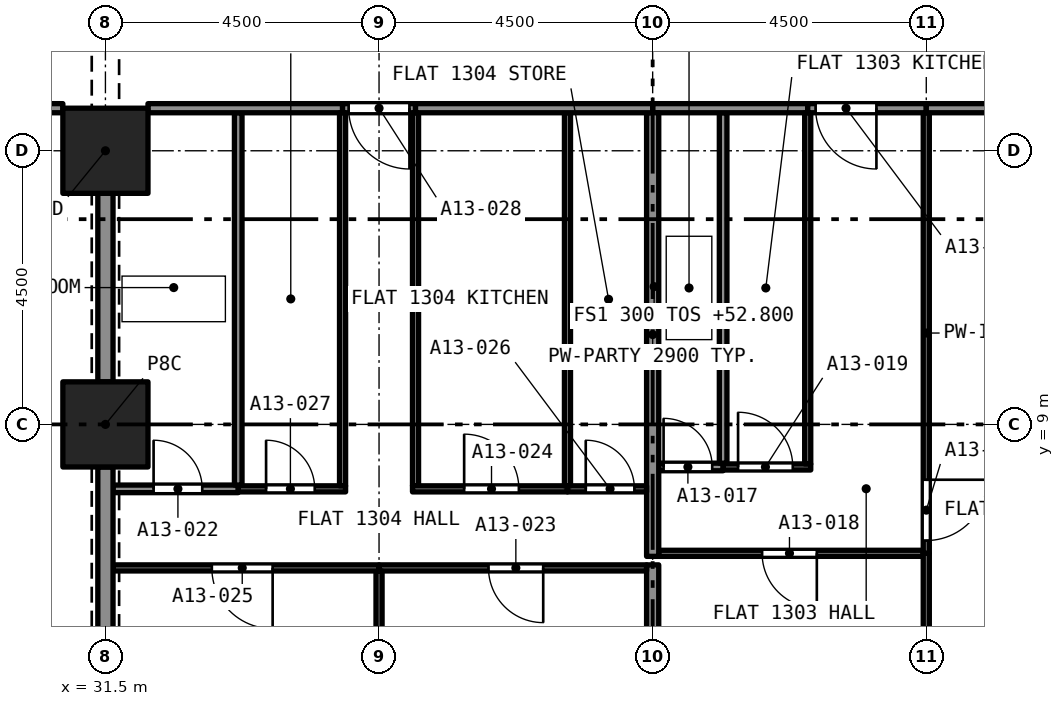
"""IFC4 building model, lengths in metres.
Left out: names, types, materials, properties, quantities, classifications, styles, units other than length and angle.
Written with IfcOpenShell. Run it as: python <this file> out.ifc"""

import sys

from ifc_helpers import new_model, si_unit, direction, frame, frame_2d, origin, origin_2d, place, context, subcontext, project, spatial, rectangle, extrude, element, fill, save


model = new_model("IFC4")
c1 = context("Model", 3, precision=1e-05, world=origin(), true_north=direction((0.0, 1.0)))
c2 = subcontext(c1, "Body", "Model", "MODEL_VIEW")
j1 = project(units=[si_unit("LENGTHUNIT", "METRE"), si_unit("PLANEANGLEUNIT", "RADIAN")], contexts=[c1])
p1 = place(None, origin())
s1 = spatial("IfcSite", under=j1, at=p1, CompositionType="ELEMENT")
p2 = place(p1, origin())
s2 = spatial("IfcBuilding", under=s1, at=p2, CompositionType="ELEMENT")
p3 = place(p2, frame((0.0, 0.0, 52.8)))
s3 = spatial("IfcBuildingStorey", under=s2, at=p3, CompositionType="ELEMENT", Elevation=52.8)
for number, where, z_axis, x_axis in (
    (1, (31.5, 9.0, 0.0), (0.0, 0.0, 1.0), (1.0, 0.0, 0.0)),
    (2, (31.5, 13.5, 0.0), (0.0, 0.0, 1.0), (1.0, 0.0, 0.0)),
):
    element("IfcColumn", number, at=place(p3, frame(where, z_axis=z_axis, x_axis=x_axis)), inside=s3, PredefinedType="COLUMN", context=c2, shape_type="SweptSolid", body=[
        extrude(rectangle(XDim=1.4, YDim=1.4, at=origin_2d()), origin(), (0.0, 0.0, 1.0), 3.2),
    ])
p4 = place(p3, frame((40.6, 8.3, 0.0), z_axis=(0.0, 0.0, 1.0), x_axis=(1.0, 0.0, 0.0)))
e3 = element("IfcWall", 3, at=p4, inside=s3, PredefinedType="PARTITIONING", context=c2, shape_type="SweptSolid", body=[
    extrude(rectangle(XDim=1.059, YDim=0.125, at=frame_2d((0.53, 0.0))), origin(), (0.0, 0.0, 1.0), 2.9),
])
p5 = place(p4, frame((0.08, 0.0, 0.0)))
e4 = element("IfcOpeningElement", 4, at=p5, cuts=e3, PredefinedType="OPENING", context=c2, shape_type="SweptSolid", body=[
    extrude(rectangle(XDim=0.8, YDim=2.1, at=frame_2d((0.4, 1.05))), frame((0.0, 0.073, 0.0), z_axis=(0.0, -1.0, 0.0), x_axis=(1.0, 0.0, 0.0)), (0.0, 0.0, 1.0), 0.145),
])
p6 = place(p3, frame((41.659, 8.363, 0.0), z_axis=(0.0, 0.0, 1.0), x_axis=(0.0, 1.0, 0.0)))
e5 = element("IfcWall", 5, at=p6, inside=s3, PredefinedType="PARTITIONING", context=c2, shape_type="SweptSolid", body=[
    extrude(rectangle(XDim=5.762, YDim=0.125, at=frame_2d((2.881, 0.0))), origin(), (0.0, 0.0, 1.0), 2.9),
])
p7 = place(p3, frame((40.5, 14.2, 0.0), z_axis=(0.0, 0.0, 1.0), x_axis=(1.0, 0.0, 0.0)))
e6 = element("IfcWall", 6, at=p7, inside=s3, PredefinedType="PARTITIONING", context=c2, shape_type="SweptSolid", body=[
    extrude(rectangle(XDim=2.55, YDim=0.15, at=frame_2d((1.275, 0.0))), origin(), (0.0, 0.0, 1.0), 2.9),
])
p8 = place(p3, frame((44.95, 6.88, 0.0), z_axis=(0.0, 0.0, 1.0), x_axis=(-1.0, 0.0, 0.0)))
e7 = element("IfcWall", 7, at=p8, inside=s3, PredefinedType="PARTITIONING", context=c2, shape_type="SweptSolid", body=[
    extrude(rectangle(XDim=4.35, YDim=0.1, at=frame_2d((2.175, 0.0))), origin(), (0.0, 0.0, 1.0), 2.9),
])
p9 = place(p8, frame((1.75, 0.0, 0.0)))
e8 = element("IfcOpeningElement", 8, at=p9, cuts=e7, PredefinedType="OPENING", context=c2, shape_type="SweptSolid", body=[
    extrude(rectangle(XDim=0.9, YDim=2.1, at=frame_2d((0.45, 1.05))), frame((0.0, 0.06, 0.0), z_axis=(0.0, -1.0, 0.0), x_axis=(1.0, 0.0, 0.0)), (0.0, 0.0, 1.0), 0.12),
])
p10 = place(p3, frame((45.0, 0.758, 0.0), z_axis=(0.0, 0.0, 1.0), x_axis=(0.0, 1.0, 0.0)))
e9 = element("IfcWall", 9, at=p10, inside=s3, PredefinedType="PARTITIONING", context=c2, shape_type="SweptSolid", body=[
    extrude(rectangle(XDim=6.122, YDim=0.1, at=frame_2d((3.061, 0.0))), origin(), (0.0, 0.0, 1.0), 2.9),
])
p11 = place(p3, frame((40.5, 0.7, 0.0), z_axis=(0.0, 0.0, 1.0), x_axis=(0.0, 1.0, 0.0)))
e10 = element("IfcWall", 10, at=p11, inside=s3, PredefinedType="PARTITIONING", context=c2, shape_type="SweptSolid", body=[
    extrude(rectangle(XDim=5.99, YDim=0.2, at=frame_2d((2.995, 0.0))), origin(), (0.0, 0.0, 1.0), 2.9),
])
p12 = place(p3, frame((41.659, 8.3, 0.0), z_axis=(0.0, 0.0, 1.0), x_axis=(1.0, 0.0, 0.0)))
e11 = element("IfcWall", 11, at=p12, inside=s3, PredefinedType="PARTITIONING", context=c2, shape_type="SweptSolid", body=[
    extrude(rectangle(XDim=1.441, YDim=0.1, at=frame_2d((0.72, 0.0))), origin(), (0.0, 0.0, 1.0), 2.9),
])
p13 = place(p12, frame((0.246, 0.0, 0.0)))
e12 = element("IfcOpeningElement", 12, at=p13, cuts=e11, PredefinedType="OPENING", context=c2, shape_type="SweptSolid", body=[
    extrude(rectangle(XDim=0.9, YDim=2.1, at=frame_2d((0.45, 1.05))), frame((0.0, 0.06, 0.0), z_axis=(0.0, -1.0, 0.0), x_axis=(1.0, 0.0, 0.0)), (0.0, 0.0, 1.0), 0.12),
])
p14 = place(p3, frame((43.05, 8.35, 0.0), z_axis=(0.0, 0.0, 1.0), x_axis=(0.0, 1.0, 0.0)))
e13 = element("IfcWall", 13, at=p14, inside=s3, PredefinedType="PARTITIONING", context=c2, shape_type="SweptSolid", body=[
    extrude(rectangle(XDim=5.775, YDim=0.1, at=frame_2d((2.887, 0.0))), origin(), (0.0, 0.0, 1.0), 2.9),
])
p15 = place(p3, frame((45.0, 14.125, 0.0), z_axis=(0.0, 0.0, 1.0), x_axis=(0.0, -1.0, 0.0)))
e14 = element("IfcWall", 14, at=p15, inside=s3, PredefinedType="PARTITIONING", context=c2, shape_type="SweptSolid", body=[
    extrude(rectangle(XDim=7.245, YDim=0.1, at=frame_2d((3.623, 0.0))), origin(), (0.0, 0.0, 1.0), 2.9),
])
p16 = place(p15, frame((6.035, 0.0, 0.0)))
e15 = element("IfcOpeningElement", 15, at=p16, cuts=e14, PredefinedType="OPENING", context=c2, shape_type="SweptSolid", body=[
    extrude(rectangle(XDim=1.0, YDim=2.1, at=frame_2d((0.5, 1.05))), frame((0.0, 0.06, 0.0), z_axis=(0.0, -1.0, 0.0), x_axis=(1.0, 0.0, 0.0)), (0.0, 0.0, 1.0), 0.12),
])
p17 = place(p3, frame((40.5, 6.83, 0.0), z_axis=(0.0, 0.0, 1.0), x_axis=(0.0, 1.0, 0.0)))
e16 = element("IfcWall", 16, at=p17, inside=s3, PredefinedType="PARTITIONING", context=c2, shape_type="SweptSolid", body=[
    extrude(rectangle(XDim=7.295, YDim=0.2, at=frame_2d((3.647, 0.0))), origin(), (0.0, 0.0, 1.0), 2.9),
])
p18 = place(p3, frame((45.0, 14.2, 0.0), z_axis=(0.0, 0.0, 1.0), x_axis=(-1.0, 0.0, 0.0)))
e17 = element("IfcWall", 17, at=p18, inside=s3, PredefinedType="PARTITIONING", context=c2, shape_type="SweptSolid", body=[
    extrude(rectangle(XDim=1.95, YDim=0.15, at=frame_2d((0.975, 0.0))), origin(), (0.0, 0.0, 1.0), 2.9),
])
p19 = place(p18, frame((0.82, 0.0, 0.0)))
e18 = element("IfcOpeningElement", 18, at=p19, cuts=e17, PredefinedType="OPENING", context=c2, shape_type="SweptSolid", body=[
    extrude(rectangle(XDim=1.0, YDim=2.1, at=frame_2d((0.5, 1.05))), frame((0.0, 0.085, 0.0), z_axis=(0.0, -1.0, 0.0), x_axis=(1.0, 0.0, 0.0)), (0.0, 0.0, 1.0), 0.17),
])
p20 = place(p3, frame((45.0, 14.2, 0.0), z_axis=(0.0, 0.0, 1.0), x_axis=(1.0, 0.0, 0.0)))
e19 = element("IfcWall", 19, at=p20, inside=s3, PredefinedType="PARTITIONING", context=c2, shape_type="SweptSolid", body=[
    extrude(rectangle(XDim=3.8, YDim=0.15, at=frame_2d((1.9, 0.0))), origin(), (0.0, 0.0, 1.0), 2.9),
])
p21 = place(p3, frame((31.625, 7.94, 0.0), z_axis=(0.0, 0.0, 1.0), x_axis=(1.0, 0.0, 0.0)))
e20 = element("IfcWall", 20, at=p21, inside=s3, PredefinedType="PARTITIONING", context=c2, shape_type="SweptSolid", body=[
    extrude(rectangle(XDim=2.059, YDim=0.125, at=frame_2d((1.03, 0.0))), origin(), (0.0, 0.0, 1.0), 2.9),
])
p22 = place(p21, frame((0.667, 0.0, 0.0)))
e21 = element("IfcOpeningElement", 21, at=p22, cuts=e20, PredefinedType="OPENING", context=c2, shape_type="SweptSolid", body=[
    extrude(rectangle(XDim=0.8, YDim=2.1, at=frame_2d((0.4, 1.05))), frame((0.0, 0.073, 0.0), z_axis=(0.0, -1.0, 0.0), x_axis=(1.0, 0.0, 0.0)), (0.0, 0.0, 1.0), 0.145),
])
p23 = place(p3, frame((33.684, 8.002, 0.0), z_axis=(0.0, 0.0, 1.0), x_axis=(0.0, 1.0, 0.0)))
e22 = element("IfcWall", 22, at=p23, inside=s3, PredefinedType="PARTITIONING", context=c2, shape_type="SweptSolid", body=[
    extrude(rectangle(XDim=6.123, YDim=0.125, at=frame_2d((3.061, 0.0))), origin(), (0.0, 0.0, 1.0), 2.9),
])
p24 = place(p3, frame((31.5, 9.7, 0.0), z_axis=(0.0, 0.0, 1.0), x_axis=(0.0, 1.0, 0.0)))
e23 = element("IfcWall", 23, at=p24, inside=s3, PredefinedType="PARTITIONING", context=c2, shape_type="SweptSolid", body=[
    extrude(rectangle(XDim=3.1, YDim=0.25, at=frame_2d((1.55, 0.0))), origin(), (0.0, 0.0, 1.0), 2.38),
])
p25 = place(p3, frame((32.2, 14.2, 0.0), z_axis=(0.0, 0.0, 1.0), x_axis=(1.0, 0.0, 0.0)))
e24 = element("IfcWall", 24, at=p25, inside=s3, PredefinedType="PARTITIONING", context=c2, shape_type="SweptSolid", body=[
    extrude(rectangle(XDim=3.2, YDim=0.15, at=frame_2d((1.6, 0.0))), origin(), (0.0, 0.0, 1.0), 2.9),
])
p26 = place(p3, frame((40.4, 6.64, 0.0), z_axis=(0.0, 0.0, 1.0), x_axis=(-1.0, 0.0, 0.0)))
e25 = element("IfcWall", 25, at=p26, inside=s3, PredefinedType="PARTITIONING", context=c2, shape_type="SweptSolid", body=[
    extrude(rectangle(XDim=4.4, YDim=0.1, at=frame_2d((2.2, 0.0))), origin(), (0.0, 0.0, 1.0), 2.9),
])
p27 = place(p26, frame((1.7, 0.0, 0.0)))
e26 = element("IfcOpeningElement", 26, at=p27, cuts=e25, PredefinedType="OPENING", context=c2, shape_type="SweptSolid", body=[
    extrude(rectangle(XDim=0.9, YDim=2.1, at=frame_2d((0.45, 1.05))), frame((0.0, 0.06, 0.0), z_axis=(0.0, -1.0, 0.0), x_axis=(1.0, 0.0, 0.0)), (0.0, 0.0, 1.0), 0.12),
])
p28 = place(p3, frame((36.0, 0.7, 0.0), z_axis=(0.0, 0.0, 1.0), x_axis=(0.0, 1.0, 0.0)))
e27 = element("IfcWall", 27, at=p28, inside=s3, PredefinedType="PARTITIONING", context=c2, shape_type="SweptSolid", body=[
    extrude(rectangle(XDim=5.89, YDim=0.1, at=frame_2d((2.945, 0.0))), origin(), (0.0, 0.0, 1.0), 2.9),
])
p29 = place(p3, frame((36.6, 7.99, 0.0), z_axis=(0.0, 0.0, 1.0), x_axis=(0.0, 1.0, 0.0)))
e28 = element("IfcWall", 28, at=p29, inside=s3, PredefinedType="PARTITIONING", context=c2, shape_type="SweptSolid", body=[
    extrude(rectangle(XDim=6.135, YDim=0.1, at=frame_2d((3.067, 0.0))), origin(), (0.0, 0.0, 1.0), 2.9),
])
p30 = place(p3, frame((36.55, 7.94, 0.0), z_axis=(0.0, 0.0, 1.0), x_axis=(1.0, 0.0, 0.0)))
e29 = element("IfcWall", 29, at=p30, inside=s3, PredefinedType="PARTITIONING", context=c2, shape_type="SweptSolid", body=[
    extrude(rectangle(XDim=2.549, YDim=0.1, at=frame_2d((1.275, 0.0))), origin(), (0.0, 0.0, 1.0), 2.9),
])
p31 = place(p30, frame((0.85, 0.0, 0.0)))
e30 = element("IfcOpeningElement", 30, at=p31, cuts=e29, PredefinedType="OPENING", context=c2, shape_type="SweptSolid", body=[
    extrude(rectangle(XDim=0.9, YDim=2.1, at=frame_2d((0.45, 1.05))), frame((0.0, 0.06, 0.0), z_axis=(0.0, -1.0, 0.0), x_axis=(1.0, 0.0, 0.0)), (0.0, 0.0, 1.0), 0.12),
])
p32 = place(p3, frame((36.0, 6.64, 0.0), z_axis=(0.0, 0.0, 1.0), x_axis=(-1.0, 0.0, 0.0)))
e31 = element("IfcWall", 31, at=p32, inside=s3, PredefinedType="PARTITIONING", context=c2, shape_type="SweptSolid", body=[
    extrude(rectangle(XDim=4.375, YDim=0.1, at=frame_2d((2.188, 0.0))), origin(), (0.0, 0.0, 1.0), 2.9),
])
p33 = place(p32, frame((1.75, 0.0, 0.0)))
e32 = element("IfcOpeningElement", 32, at=p33, cuts=e31, PredefinedType="OPENING", context=c2, shape_type="SweptSolid", body=[
    extrude(rectangle(XDim=1.0, YDim=2.1, at=frame_2d((0.5, 1.05))), frame((0.0, 0.06, 0.0), z_axis=(0.0, -1.0, 0.0), x_axis=(1.0, 0.0, 0.0)), (0.0, 0.0, 1.0), 0.12),
])
p34 = place(p3, frame((39.099, 7.94, 0.0), z_axis=(0.0, 0.0, 1.0), x_axis=(1.0, 0.0, 0.0)))
e33 = element("IfcWall", 33, at=p34, inside=s3, PredefinedType="PARTITIONING", context=c2, shape_type="SweptSolid", body=[
    extrude(rectangle(XDim=1.301, YDim=0.1, at=frame_2d((0.65, 0.0))), origin(), (0.0, 0.0, 1.0), 2.9),
])
p35 = place(p34, frame((0.3, 0.0, 0.0)))
e34 = element("IfcOpeningElement", 34, at=p35, cuts=e33, PredefinedType="OPENING", context=c2, shape_type="SweptSolid", body=[
    extrude(rectangle(XDim=0.8, YDim=2.1, at=frame_2d((0.4, 1.05))), frame((0.0, 0.06, 0.0), z_axis=(0.0, -1.0, 0.0), x_axis=(1.0, 0.0, 0.0)), (0.0, 0.0, 1.0), 0.12),
])
p36 = place(p3, frame((33.684, 7.94, 0.0), z_axis=(0.0, 0.0, 1.0), x_axis=(1.0, 0.0, 0.0)))
e35 = element("IfcWall", 35, at=p36, inside=s3, PredefinedType="PARTITIONING", context=c2, shape_type="SweptSolid", body=[
    extrude(rectangle(XDim=1.766, YDim=0.1, at=frame_2d((0.883, 0.0))), origin(), (0.0, 0.0, 1.0), 2.9),
])
p37 = place(p36, frame((0.458, 0.0, 0.0)))
e36 = element("IfcOpeningElement", 36, at=p37, cuts=e35, PredefinedType="OPENING", context=c2, shape_type="SweptSolid", body=[
    extrude(rectangle(XDim=0.8, YDim=2.1, at=frame_2d((0.4, 1.05))), frame((0.0, 0.06, 0.0), z_axis=(0.0, -1.0, 0.0), x_axis=(1.0, 0.0, 0.0)), (0.0, 0.0, 1.0), 0.12),
])
p38 = place(p3, frame((35.4, 7.99, 0.0), z_axis=(0.0, 0.0, 1.0), x_axis=(0.0, 1.0, 0.0)))
e37 = element("IfcWall", 37, at=p38, inside=s3, PredefinedType="PARTITIONING", context=c2, shape_type="SweptSolid", body=[
    extrude(rectangle(XDim=6.135, YDim=0.1, at=frame_2d((3.067, 0.0))), origin(), (0.0, 0.0, 1.0), 2.9),
])
p39 = place(p3, frame((36.6, 14.2, 0.0), z_axis=(0.0, 0.0, 1.0), x_axis=(-1.0, 0.0, 0.0)))
e38 = element("IfcWall", 38, at=p39, inside=s3, PredefinedType="PARTITIONING", context=c2, shape_type="SweptSolid", body=[
    extrude(rectangle(XDim=1.2, YDim=0.15, at=frame_2d((0.6, 0.0))), origin(), (0.0, 0.0, 1.0), 2.9),
])
p40 = place(p39, frame((0.1, 0.0, 0.0)))
e39 = element("IfcOpeningElement", 39, at=p40, cuts=e38, PredefinedType="OPENING", context=c2, shape_type="SweptSolid", body=[
    extrude(rectangle(XDim=1.0, YDim=2.1, at=frame_2d((0.5, 1.05))), frame((0.0, 0.085, 0.0), z_axis=(0.0, -1.0, 0.0), x_axis=(1.0, 0.0, 0.0)), (0.0, 0.0, 1.0), 0.17),
])
p41 = place(p3, frame((39.099, 7.99, 0.0), z_axis=(0.0, 0.0, 1.0), x_axis=(0.0, 1.0, 0.0)))
e40 = element("IfcWall", 40, at=p41, inside=s3, PredefinedType="PARTITIONING", context=c2, shape_type="SweptSolid", body=[
    extrude(rectangle(XDim=6.135, YDim=0.1, at=frame_2d((3.067, 0.0))), origin(), (0.0, 0.0, 1.0), 2.9),
])
p42 = place(p3, frame((36.6, 14.2, 0.0), z_axis=(0.0, 0.0, 1.0), x_axis=(1.0, 0.0, 0.0)))
e41 = element("IfcWall", 41, at=p42, inside=s3, PredefinedType="PARTITIONING", context=c2, shape_type="SweptSolid", body=[
    extrude(rectangle(XDim=3.9, YDim=0.15, at=frame_2d((1.95, 0.0))), origin(), (0.0, 0.0, 1.0), 2.9),
])
p43 = place(p3, frame((31.5, 5.2, 0.0), z_axis=(0.0, 0.0, 1.0), x_axis=(0.0, 1.0, 0.0)))
e42 = element("IfcWall", 42, at=p43, inside=s3, PredefinedType="PARTITIONING", context=c2, shape_type="SweptSolid", body=[
    extrude(rectangle(XDim=3.1, YDim=0.25, at=frame_2d((1.55, 0.0))), origin(), (0.0, 0.0, 1.0), 2.38),
])
p44 = place(p3, frame((30.8, 14.2, 0.0), z_axis=(0.0, 0.0, 1.0), x_axis=(-1.0, 0.0, 0.0)))
e43 = element("IfcWall", 43, at=p44, inside=s3, PredefinedType="PARTITIONING", context=c2, shape_type="SweptSolid", body=[
    extrude(rectangle(XDim=3.8, YDim=0.15, at=frame_2d((1.9, 0.0))), origin(), (0.0, 0.0, 1.0), 2.75),
])
p45 = place(p44, frame((1.05, 0.0, 0.0)))
e44 = element("IfcOpeningElement", 44, at=p45, cuts=e43, PredefinedType="OPENING", context=c2, shape_type="SweptSolid", body=[
    extrude(rectangle(XDim=1.0, YDim=2.1, at=frame_2d((0.5, 1.05))), frame((0.0, 0.085, 0.0), z_axis=(0.0, -1.0, 0.0), x_axis=(1.0, 0.0, 0.0)), (0.0, 0.0, 1.0), 0.17),
])
p46 = place(p5, origin())
e45 = element("IfcDoor", 45, at=p46, inside=s3, OperationType="SINGLE_SWING_LEFT", PredefinedType="DOOR", context=c2, shape_type="SweptSolid", body=[
    extrude(rectangle(XDim=0.8, YDim=2.1, at=frame_2d((0.4, 1.05))), frame((0.0, 0.025, 0.0), z_axis=(0.0, -1.0, 0.0), x_axis=(1.0, 0.0, 0.0)), (0.0, 0.0, 1.0), 0.05),
])
fill(e4, e45)
p47 = place(p9, origin())
e46 = element("IfcDoor", 46, at=p47, inside=s3, OperationType="SINGLE_SWING_RIGHT", PredefinedType="DOOR", context=c2, shape_type="SweptSolid", body=[
    extrude(rectangle(XDim=0.9, YDim=2.1, at=frame_2d((0.45, 1.05))), frame((0.0, 0.025, 0.0), z_axis=(0.0, -1.0, 0.0), x_axis=(1.0, 0.0, 0.0)), (0.0, 0.0, 1.0), 0.05),
])
fill(e8, e46)
p48 = place(p13, origin())
e47 = element("IfcDoor", 47, at=p48, inside=s3, OperationType="SINGLE_SWING_LEFT", PredefinedType="DOOR", context=c2, shape_type="SweptSolid", body=[
    extrude(rectangle(XDim=0.9, YDim=2.1, at=frame_2d((0.45, 1.05))), frame((0.0, 0.025, 0.0), z_axis=(0.0, -1.0, 0.0), x_axis=(1.0, 0.0, 0.0)), (0.0, 0.0, 1.0), 0.05),
])
fill(e12, e47)
p49 = place(p16, origin())
e48 = element("IfcDoor", 48, at=p49, inside=s3, OperationType="SINGLE_SWING_RIGHT", PredefinedType="DOOR", context=c2, shape_type="SweptSolid", body=[
    extrude(rectangle(XDim=1.0, YDim=2.1, at=frame_2d((0.5, 1.05))), frame((0.0, 0.025, 0.0), z_axis=(0.0, -1.0, 0.0), x_axis=(1.0, 0.0, 0.0)), (0.0, 0.0, 1.0), 0.05),
])
fill(e15, e48)
p50 = place(p19, origin())
e49 = element("IfcDoor", 49, at=p50, inside=s3, OperationType="SINGLE_SWING_RIGHT", PredefinedType="DOOR", context=c2, shape_type="SweptSolid", body=[
    extrude(rectangle(XDim=1.0, YDim=2.1, at=frame_2d((0.5, 1.05))), frame((0.0, 0.025, 0.0), z_axis=(0.0, -1.0, 0.0), x_axis=(1.0, 0.0, 0.0)), (0.0, 0.0, 1.0), 0.05),
])
fill(e18, e49)
p51 = place(p22, origin())
e50 = element("IfcDoor", 50, at=p51, inside=s3, OperationType="SINGLE_SWING_RIGHT", PredefinedType="DOOR", context=c2, shape_type="SweptSolid", body=[
    extrude(rectangle(XDim=0.8, YDim=2.1, at=frame_2d((0.4, 1.05))), frame((0.0, 0.025, 0.0), z_axis=(0.0, -1.0, 0.0), x_axis=(1.0, 0.0, 0.0)), (0.0, 0.0, 1.0), 0.05),
])
fill(e21, e50)
p52 = place(p27, origin())
e51 = element("IfcDoor", 51, at=p52, inside=s3, OperationType="SINGLE_SWING_LEFT", PredefinedType="DOOR", context=c2, shape_type="SweptSolid", body=[
    extrude(rectangle(XDim=0.9, YDim=2.1, at=frame_2d((0.45, 1.05))), frame((0.0, 0.025, 0.0), z_axis=(0.0, -1.0, 0.0), x_axis=(1.0, 0.0, 0.0)), (0.0, 0.0, 1.0), 0.05),
])
fill(e26, e51)
p53 = place(p31, origin())
e52 = element("IfcDoor", 52, at=p53, inside=s3, OperationType="SINGLE_SWING_RIGHT", PredefinedType="DOOR", context=c2, shape_type="SweptSolid", body=[
    extrude(rectangle(XDim=0.9, YDim=2.1, at=frame_2d((0.45, 1.05))), frame((0.0, 0.025, 0.0), z_axis=(0.0, -1.0, 0.0), x_axis=(1.0, 0.0, 0.0)), (0.0, 0.0, 1.0), 0.05),
])
fill(e30, e52)
p54 = place(p33, origin())
e53 = element("IfcDoor", 53, at=p54, inside=s3, OperationType="SINGLE_SWING_RIGHT", PredefinedType="DOOR", context=c2, shape_type="SweptSolid", body=[
    extrude(rectangle(XDim=1.0, YDim=2.1, at=frame_2d((0.5, 1.05))), frame((0.0, 0.025, 0.0), z_axis=(0.0, -1.0, 0.0), x_axis=(1.0, 0.0, 0.0)), (0.0, 0.0, 1.0), 0.05),
])
fill(e32, e53)
p55 = place(p35, origin())
e54 = element("IfcDoor", 54, at=p55, inside=s3, OperationType="SINGLE_SWING_RIGHT", PredefinedType="DOOR", context=c2, shape_type="SweptSolid", body=[
    extrude(rectangle(XDim=0.8, YDim=2.1, at=frame_2d((0.4, 1.05))), frame((0.0, 0.025, 0.0), z_axis=(0.0, -1.0, 0.0), x_axis=(1.0, 0.0, 0.0)), (0.0, 0.0, 1.0), 0.05),
])
fill(e34, e54)
p56 = place(p37, origin())
e55 = element("IfcDoor", 55, at=p56, inside=s3, OperationType="SINGLE_SWING_LEFT", PredefinedType="DOOR", context=c2, shape_type="SweptSolid", body=[
    extrude(rectangle(XDim=0.8, YDim=2.1, at=frame_2d((0.4, 1.05))), frame((0.0, 0.025, 0.0), z_axis=(0.0, -1.0, 0.0), x_axis=(1.0, 0.0, 0.0)), (0.0, 0.0, 1.0), 0.05),
])
fill(e36, e55)
p57 = place(p40, origin())
e56 = element("IfcDoor", 56, at=p57, inside=s3, OperationType="SINGLE_SWING_RIGHT", PredefinedType="DOOR", context=c2, shape_type="SweptSolid", body=[
    extrude(rectangle(XDim=1.0, YDim=2.1, at=frame_2d((0.5, 1.05))), frame((0.0, 0.025, 0.0), z_axis=(0.0, -1.0, 0.0), x_axis=(1.0, 0.0, 0.0)), (0.0, 0.0, 1.0), 0.05),
])
fill(e39, e56)
save(model, sys.argv[1])
